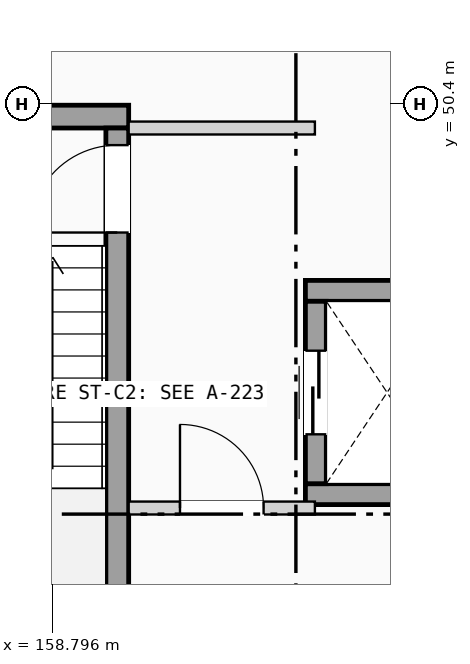
"""IFC4 building model, lengths in metres.
Left out: names, types, materials, properties, quantities, classifications, styles, units other than length and angle.
Written with IfcOpenShell. Run it as: python <this file> out.ifc"""

import sys

from ifc_helpers import new_model, si_unit, direction, frame, frame_2d, origin, place, context, subcontext, project, spatial, rectangle, extrude, element, fill, save


model = new_model("IFC4")
c1 = context("Model", 3, precision=1e-05, world=origin(), true_north=direction((0.0, 1.0)))
c2 = subcontext(c1, "Body", "Model", "MODEL_VIEW")
j1 = project(units=[si_unit("LENGTHUNIT", "METRE"), si_unit("PLANEANGLEUNIT", "RADIAN")], contexts=[c1])
p1 = place(None, origin())
s1 = spatial("IfcSite", under=j1, at=p1, CompositionType="ELEMENT")
p2 = place(p1, origin())
s2 = spatial("IfcBuilding", under=s1, at=p2, CompositionType="ELEMENT")
p3 = place(p2, frame((0.0, 0.0, -4.2)))
s3 = spatial("IfcBuildingStorey", under=s2, at=p3, CompositionType="ELEMENT", Elevation=-4.2)
p4 = place(p3, frame((156.2, 50.23, 0.0), z_axis=(0.0, 0.0, 1.0), x_axis=(1.0, 0.0, 0.0)))
e1 = element("IfcWall", 1, at=p4, inside=s3, PredefinedType="SHEAR", context=c2, shape_type="SweptSolid", body=[
    extrude(rectangle(XDim=3.6, YDim=0.3, at=frame_2d((1.8, 0.0))), origin(), (0.0, 0.0, 1.0), 3.92),
])
p5 = place(p3, frame((159.65, 43.08, 0.0), z_axis=(0.0, 0.0, 1.0), x_axis=(0.0, 1.0, 0.0)))
e2 = element("IfcWall", 2, at=p5, inside=s3, PredefinedType="SHEAR", context=c2, shape_type="SweptSolid", body=[
    extrude(rectangle(XDim=7.0, YDim=0.3, at=frame_2d((3.5, 0.0))), origin(), (0.0, 0.0, 1.0), 3.92),
])
p6 = place(p5, frame((5.625, 0.0, 0.0)))
e3 = element("IfcOpeningElement", 3, at=p6, cuts=e2, PredefinedType="OPENING", context=c2, shape_type="SweptSolid", body=[
    extrude(rectangle(XDim=1.15, YDim=2.12, at=frame_2d((0.575, 1.06))), frame((0.0, 0.16, 0.0), z_axis=(0.0, -1.0, 0.0), x_axis=(1.0, 0.0, 0.0)), (0.0, 0.0, 1.0), 0.32),
])
for number, where, z_axis, x_axis in (
    (4, (162.125, 45.262, 0.0), (0.0, 0.0, 1.0), (1.0, 0.0, 0.0)),
    (5, (162.125, 47.938, 0.0), (0.0, 0.0, 1.0), (1.0, 0.0, 0.0)),
):
    element("IfcWall", number, at=place(p3, frame(where, z_axis=z_axis, x_axis=x_axis)), inside=s3, PredefinedType="SHEAR", context=c2, shape_type="SweptSolid", body=[
        extrude(rectangle(XDim=2.15, YDim=0.275, at=frame_2d((1.075, 0.0))), origin(), (0.0, 0.0, 1.0), 3.92),
    ])
p7 = place(p3, frame((162.262, 45.4, 0.0), z_axis=(0.0, 0.0, 1.0), x_axis=(0.0, 1.0, 0.0)))
e6 = element("IfcWall", 6, at=p7, inside=s3, PredefinedType="SHEAR", context=c2, shape_type="SweptSolid", body=[
    extrude(rectangle(XDim=2.4, YDim=0.275, at=frame_2d((1.2, 0.0))), origin(), (0.0, 0.0, 1.0), 3.92),
])
p8 = place(p7, frame((0.65, 0.0, 0.0)))
e7 = element("IfcOpeningElement", 7, at=p8, cuts=e6, PredefinedType="OPENING", context=c2, shape_type="SweptSolid", body=[
    extrude(rectangle(XDim=1.1, YDim=2.15, at=frame_2d((0.55, 1.075))), frame((0.0, 0.147, 0.0), z_axis=(0.0, -1.0, 0.0), x_axis=(1.0, 0.0, 0.0)), (0.0, 0.0, 1.0), 0.295),
])
p9 = place(p3, frame((159.8, 45.08, 0.0), z_axis=(0.0, 0.0, 1.0), x_axis=(1.0, 0.0, 0.0)))
e8 = element("IfcWall", 8, at=p9, inside=s3, PredefinedType="PARTITIONING", context=c2, shape_type="SweptSolid", body=[
    extrude(rectangle(XDim=2.45, YDim=0.17, at=frame_2d((1.225, 0.0))), origin(), (0.0, 0.0, 1.0), 3.84),
])
p10 = place(p9, frame((0.675, 0.0, 0.0)))
e9 = element("IfcOpeningElement", 9, at=p10, cuts=e8, PredefinedType="OPENING", context=c2, shape_type="SweptSolid", body=[
    extrude(rectangle(XDim=1.1, YDim=2.12, at=frame_2d((0.55, 1.06))), frame((0.0, 0.095, 0.0), z_axis=(0.0, -1.0, 0.0), x_axis=(1.0, 0.0, 0.0)), (0.0, 0.0, 1.0), 0.19),
])
p11 = place(p3, frame((159.8, 50.08, 0.0), z_axis=(0.0, 0.0, 1.0), x_axis=(1.0, 0.0, 0.0)))
e10 = element("IfcWall", 10, at=p11, inside=s3, PredefinedType="PARTITIONING", context=c2, shape_type="SweptSolid", body=[
    extrude(rectangle(XDim=2.45, YDim=0.17, at=frame_2d((1.225, 0.0))), origin(), (0.0, 0.0, 1.0), 3.19),
])
p12 = place(p6, origin())
e11 = element("IfcDoor", 11, at=p12, inside=s3, OperationType="SINGLE_SWING_LEFT", PredefinedType="DOOR", context=c2, shape_type="SweptSolid", body=[
    extrude(rectangle(XDim=1.15, YDim=2.12, at=frame_2d((0.575, 1.06))), frame((0.0, 0.025, 0.0), z_axis=(0.0, -1.0, 0.0), x_axis=(1.0, 0.0, 0.0)), (0.0, 0.0, 1.0), 0.05),
])
fill(e3, e11)
p13 = place(p8, origin())
e12 = element("IfcDoor", 12, at=p13, inside=s3, OperationType="SLIDING_TO_LEFT", PredefinedType="DOOR", context=c2, shape_type="SweptSolid", body=[
    extrude(rectangle(XDim=1.1, YDim=2.15, at=frame_2d((0.55, 1.075))), frame((0.0, 0.025, 0.0), z_axis=(0.0, -1.0, 0.0), x_axis=(1.0, 0.0, 0.0)), (0.0, 0.0, 1.0), 0.05),
])
fill(e7, e12)
p14 = place(p10, origin())
e13 = element("IfcDoor", 13, at=p14, inside=s3, OperationType="SINGLE_SWING_LEFT", PredefinedType="DOOR", context=c2, shape_type="SweptSolid", body=[
    extrude(rectangle(XDim=1.1, YDim=2.12, at=frame_2d((0.55, 1.06))), frame((0.0, 0.025, 0.0), z_axis=(0.0, -1.0, 0.0), x_axis=(1.0, 0.0, 0.0)), (0.0, 0.0, 1.0), 0.05),
])
fill(e9, e13)
save(model, sys.argv[1])
